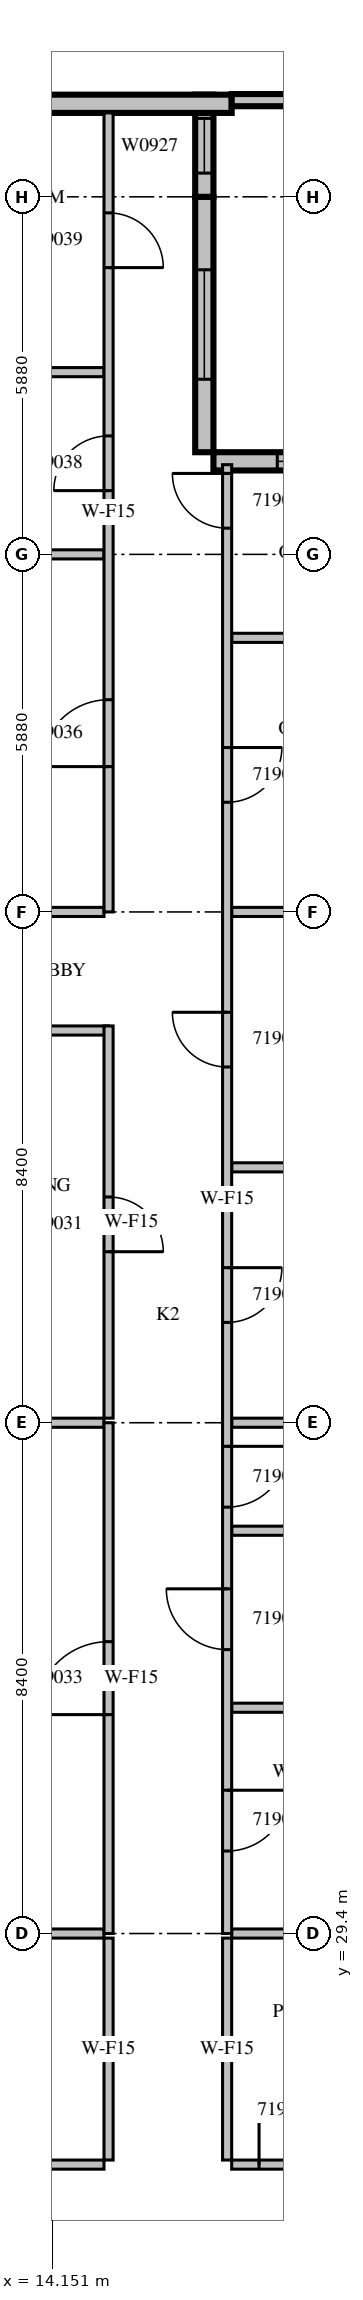
"""IFC4 building model, lengths in metres.
Left out: names, types, materials, properties, quantities, classifications, styles, units other than length and angle.
Written with IfcOpenShell. Run it as: python <this file> out.ifc"""

import sys

from ifc_helpers import new_model, si_unit, direction, frame, frame_2d, origin, place, context, subcontext, project, spatial, rectangle, extrude, source, transform, mapped, element, fill, save


model = new_model("IFC4")
c1 = context("Model", 3, precision=1e-05, world=origin(), true_north=direction((0.0, 1.0)))
c2 = subcontext(c1, "Body", "Model", "MODEL_VIEW")
j1 = project(units=[si_unit("LENGTHUNIT", "METRE"), si_unit("PLANEANGLEUNIT", "RADIAN")], contexts=[c1])
p1 = place(None, origin())
s1 = spatial("IfcSite", under=j1, at=p1, CompositionType="ELEMENT")
p2 = place(p1, origin())
s2 = spatial("IfcBuilding", under=s1, at=p2, CompositionType="ELEMENT")
p3 = place(p2, frame((0.0, 0.0, 90.9)))
s3 = spatial("IfcBuildingStorey", under=s2, at=p3, CompositionType="ELEMENT", Elevation=90.9)
m1 = source(origin(), c2, "Body", "SweptSolid", [
    extrude(rectangle(XDim=4.2, YDim=0.3, at=frame_2d((2.1, 0.0))), origin(), (0.0, 0.0, 1.0), 3.8),
])
p4 = place(p3, frame((21.0, 53.61, 0.0), z_axis=(0.0, 0.0, 1.0), x_axis=(-1.0, 0.0, 0.0)))
e1 = element("IfcWall", 1, at=p4, inside=s3, PredefinedType="STANDARD", context=c2, shape_type="MappedRepresentation", body=[
    mapped(m1, transform((0.0, 0.0, 0.0), scale=1.0)),
])
m2 = source(origin(), c2, "Body", "SweptSolid", [
    extrude(rectangle(XDim=1.8, YDim=2.4, at=frame_2d((0.9, 1.2))), frame((0.0, 0.16, 0.0), z_axis=(0.0, -1.0, 0.0), x_axis=(1.0, 0.0, 0.0)), (0.0, 0.0, 1.0), 0.32),
])
p5 = place(p4, frame((1.35, 0.0, 0.0)))
e2 = element("IfcOpeningElement", 2, at=p5, cuts=e1, PredefinedType="OPENING", context=c2, shape_type="MappedRepresentation", body=[
    mapped(m2, transform((0.0, 0.0, 0.0), scale=1.0)),
])
p6 = place(p3, frame((16.65, 53.76, 0.0), z_axis=(0.0, 0.0, 1.0), x_axis=(0.0, 1.0, 0.0)))
e3 = element("IfcWall", 3, at=p6, inside=s3, PredefinedType="STANDARD", context=c2, shape_type="MappedRepresentation", body=[
    mapped(m1, transform((0.0, 0.0, 0.0), scale=1.0)),
])
p7 = place(p6, frame((1.2, 0.0, 0.0)))
e4 = element("IfcOpeningElement", 4, at=p7, cuts=e3, PredefinedType="OPENING", context=c2, shape_type="MappedRepresentation", body=[
    mapped(m2, transform((0.0, 0.0, 0.0), scale=1.0)),
])
m3 = source(origin(), c2, "Body", "SweptSolid", [
    extrude(rectangle(XDim=1.68, YDim=0.3, at=frame_2d((0.84, 0.0))), origin(), (0.0, 0.0, 1.0), 3.8),
])
p8 = place(p3, frame((16.65, 57.96, 0.0), z_axis=(0.0, 0.0, 1.0), x_axis=(0.0, 1.0, 0.0)))
e5 = element("IfcWall", 5, at=p8, inside=s3, PredefinedType="STANDARD", context=c2, shape_type="MappedRepresentation", body=[
    mapped(m3, transform((0.0, 0.0, 0.0), scale=1.0)),
])
m4 = source(origin(), c2, "Body", "SweptSolid", [
    extrude(rectangle(XDim=0.9, YDim=2.7, at=frame_2d((0.45, 1.35))), frame((0.0, 0.16, 0.0), z_axis=(0.0, -1.0, 0.0), x_axis=(1.0, 0.0, 0.0)), (0.0, 0.0, 1.0), 0.32),
])
p9 = place(p8, frame((0.39, 0.0, 0.6)))
e6 = element("IfcOpeningElement", 6, at=p9, cuts=e5, PredefinedType="OPENING", context=c2, shape_type="MappedRepresentation", body=[
    mapped(m4, transform((0.0, 0.0, 0.0), scale=1.0)),
])
m5 = source(origin(), c2, "Body", "SweptSolid", [
    extrude(rectangle(XDim=8.7, YDim=0.3, at=frame_2d((4.35, 0.0))), origin(), (0.0, 0.0, 1.0), 3.8),
])
p10 = place(p3, frame((17.1, 59.49, 0.0), z_axis=(0.0, 0.0, 1.0), x_axis=(-1.0, 0.0, 0.0)))
e7 = element("IfcWall", 7, at=p10, inside=s3, PredefinedType="STANDARD", context=c2, shape_type="MappedRepresentation", body=[
    mapped(m5, transform((0.0, 0.0, 0.0), scale=1.0)),
])
m6 = source(origin(), c2, "Body", "SweptSolid", [
    extrude(rectangle(XDim=1.8, YDim=2.7, at=frame_2d((0.9, 1.35))), frame((0.0, 0.16, 0.0), z_axis=(0.0, -1.0, 0.0), x_axis=(1.0, 0.0, 0.0)), (0.0, 0.0, 1.0), 0.32),
])
p11 = place(p10, frame((3.075, 0.0, 0.6)))
e8 = element("IfcOpeningElement", 8, at=p11, cuts=e7, PredefinedType="OPENING", context=c2, shape_type="MappedRepresentation", body=[
    mapped(m6, transform((0.0, 0.0, 0.0), scale=1.0)),
])
p12 = place(p10, frame((6.225, 0.0, 0.6)))
e9 = element("IfcOpeningElement", 9, at=p12, cuts=e7, PredefinedType="OPENING", context=c2, shape_type="MappedRepresentation", body=[
    mapped(m6, transform((0.0, 0.0, 0.0), scale=1.0)),
])
m7 = source(origin(), c2, "Body", "SweptSolid", [
    extrude(rectangle(XDim=3.81, YDim=0.2, at=frame_2d((1.905, 0.0))), origin(), (0.0, 0.0, 1.0), 1.1),
])
p13 = place(p3, frame((17.1, 59.55, 0.0), z_axis=(0.0, 0.0, 1.0), x_axis=(1.0, 0.0, 0.0)))
e10 = element("IfcWall", 10, at=p13, inside=s3, PredefinedType="PARAPET", context=c2, shape_type="MappedRepresentation", body=[
    mapped(m7, transform((0.0, 0.0, 0.0), scale=1.0)),
])
m8 = source(origin(), c2, "Body", "SweptSolid", [
    extrude(rectangle(XDim=11.925, YDim=0.15, at=frame_2d((5.963, 0.0))), origin(), (0.0, 0.0, 1.0), 3.8),
])
p14 = place(p3, frame((3.075, 25.6, 0.0), z_axis=(0.0, 0.0, 1.0), x_axis=(1.0, 0.0, 0.0)))
e11 = element("IfcWall", 11, at=p14, inside=s3, PredefinedType="PARTITIONING", context=c2, shape_type="MappedRepresentation", body=[
    mapped(m8, transform((0.0, 0.0, 0.0), scale=1.0)),
])
m9 = source(origin(), c2, "Body", "SweptSolid", [
    extrude(rectangle(XDim=0.9, YDim=2.1, at=frame_2d((0.45, 1.05))), frame((0.0, 0.085, 0.0), z_axis=(0.0, -1.0, 0.0), x_axis=(1.0, 0.0, 0.0)), (0.0, 0.0, 1.0), 0.17),
])
p15 = place(p14, frame((1.462, 0.0, 0.0)))
e12 = element("IfcOpeningElement", 12, at=p15, cuts=e11, PredefinedType="OPENING", context=c2, shape_type="MappedRepresentation", body=[
    mapped(m9, transform((0.0, 0.0, 0.0), scale=1.0)),
])
p16 = place(p14, frame((8.3, 0.0, 0.0)))
e13 = element("IfcOpeningElement", 13, at=p16, cuts=e11, PredefinedType="OPENING", context=c2, shape_type="MappedRepresentation", body=[
    mapped(m9, transform((0.0, 0.0, 0.0), scale=1.0)),
])
m10 = source(origin(), c2, "Body", "SweptSolid", [
    extrude(rectangle(XDim=3.6, YDim=0.15, at=frame_2d((1.8, 0.0))), origin(), (0.0, 0.0, 1.0), 3.8),
])
p17 = place(p3, frame((17.1, 25.6, 0.0), z_axis=(0.0, 0.0, 1.0), x_axis=(1.0, 0.0, 0.0)))
e14 = element("IfcWall", 14, at=p17, inside=s3, PredefinedType="PARTITIONING", context=c2, shape_type="MappedRepresentation", body=[
    mapped(m10, transform((0.0, 0.0, 0.0), scale=1.0)),
])
p18 = place(p17, frame((0.45, 0.0, 0.0)))
e15 = element("IfcOpeningElement", 15, at=p18, cuts=e14, PredefinedType="OPENING", context=c2, shape_type="MappedRepresentation", body=[
    mapped(m9, transform((0.0, 0.0, 0.0), scale=1.0)),
])
m11 = source(origin(), c2, "Body", "SweptSolid", [
    extrude(rectangle(XDim=3.65, YDim=0.15, at=frame_2d((1.825, 0.0))), origin(), (0.0, 0.0, 1.0), 3.8),
])
for number, where, z_axis, x_axis in (
    (16, (15.075, 25.675, 0.0), (0.0, 0.0, 1.0), (0.0, 1.0, 0.0)),
    (17, (17.025, 29.325, 0.0), (0.0, 0.0, 1.0), (0.0, -1.0, 0.0)),
):
    element("IfcWall", number, at=place(p3, frame(where, z_axis=z_axis, x_axis=x_axis)), inside=s3, PredefinedType="PARTITIONING", context=c2, shape_type="MappedRepresentation", body=[
        mapped(m11, transform((0.0, 0.0, 0.0), scale=1.0)),
    ])
m12 = source(origin(), c2, "Body", "SweptSolid", [
    extrude(rectangle(XDim=3.901, YDim=0.15, at=frame_2d((1.95, 0.0))), origin(), (0.0, 0.0, 1.0), 3.8),
])
p19 = place(p3, frame((15.0, 29.4, 0.0), z_axis=(0.0, 0.0, 1.0), x_axis=(-1.0, 0.0, 0.0)))
e18 = element("IfcWall", 18, at=p19, inside=s3, PredefinedType="PARTITIONING", context=c2, shape_type="MappedRepresentation", body=[
    mapped(m12, transform((0.0, 0.0, 0.0), scale=1.0)),
])
m13 = source(origin(), c2, "Body", "SweptSolid", [
    extrude(rectangle(XDim=2.701, YDim=0.15, at=frame_2d((1.351, 0.0))), origin(), (0.0, 0.0, 1.0), 3.8),
])
p20 = place(p3, frame((19.801, 29.4, 0.0), z_axis=(0.0, 0.0, 1.0), x_axis=(-1.0, 0.0, 0.0)))
e19 = element("IfcWall", 19, at=p20, inside=s3, PredefinedType="PARTITIONING", context=c2, shape_type="MappedRepresentation", body=[
    mapped(m13, transform((0.0, 0.0, 0.0), scale=1.0)),
])
m14 = source(origin(), c2, "Body", "SweptSolid", [
    extrude(rectangle(XDim=2.775, YDim=0.15, at=frame_2d((1.387, 0.0))), origin(), (0.0, 0.0, 1.0), 3.8),
])
p21 = place(p3, frame((15.075, 44.25, 0.0), z_axis=(0.0, 0.0, 1.0), x_axis=(-1.0, 0.0, 0.0)))
e20 = element("IfcWall", 20, at=p21, inside=s3, PredefinedType="PARTITIONING", context=c2, shape_type="MappedRepresentation", body=[
    mapped(m14, transform((0.0, 0.0, 0.0), scale=1.0)),
])
m15 = source(origin(), c2, "Body", "SweptSolid", [
    extrude(rectangle(XDim=6.45, YDim=0.15, at=frame_2d((3.225, 0.0))), origin(), (0.0, 0.0, 1.0), 3.8),
])
p22 = place(p3, frame((15.075, 37.875, 0.0), z_axis=(0.0, 0.0, 1.0), x_axis=(0.0, 1.0, 0.0)))
e21 = element("IfcWall", 21, at=p22, inside=s3, PredefinedType="PARTITIONING", context=c2, shape_type="MappedRepresentation", body=[
    mapped(m15, transform((0.0, 0.0, 0.0), scale=1.0)),
])
p23 = place(p22, frame((2.737, 0.0, 0.0)))
e22 = element("IfcOpeningElement", 22, at=p23, cuts=e21, PredefinedType="OPENING", context=c2, shape_type="MappedRepresentation", body=[
    mapped(m9, transform((0.0, 0.0, 0.0), scale=1.0)),
])
m16 = source(origin(), c2, "Body", "SweptSolid", [
    extrude(rectangle(XDim=3.75, YDim=0.15, at=frame_2d((1.875, 0.0))), origin(), (0.0, 0.0, 1.0), 3.8),
])
for number, where, z_axis, x_axis in (
    (23, (15.0, 37.8, 0.0), (0.0, 0.0, 1.0), (-1.0, 0.0, 0.0)),
    (24, (15.0, 52.08, 0.0), (0.0, 0.0, 1.0), (-1.0, 0.0, 0.0)),
    (25, (15.0, 55.077, 0.0), (0.0, 0.0, 1.0), (-1.0, 0.0, 0.0)),
    (26, (15.0, 46.2, 0.0), (0.0, 0.0, 1.0), (-1.0, 0.0, 0.0)),
):
    element("IfcWall", number, at=place(p3, frame(where, z_axis=z_axis, x_axis=x_axis)), inside=s3, PredefinedType="PARTITIONING", context=c2, shape_type="MappedRepresentation", body=[
        mapped(m16, transform((0.0, 0.0, 0.0), scale=1.0)),
    ])
for number, where, z_axis, x_axis in (
    (27, (17.1, 33.113, 0.0), (0.0, 0.0, 1.0), (1.0, 0.0, 0.0)),
    (28, (17.1, 36.024, 0.0), (0.0, 0.0, 1.0), (1.0, 0.0, 0.0)),
    (29, (17.1, 42.0, 0.0), (0.0, 0.0, 1.0), (1.0, 0.0, 0.0)),
    (30, (17.1, 50.708, 0.0), (0.0, 0.0, 1.0), (1.0, 0.0, 0.0)),
):
    element("IfcWall", number, at=place(p3, frame(where, z_axis=z_axis, x_axis=x_axis)), inside=s3, PredefinedType="PARTITIONING", context=c2, shape_type="MappedRepresentation", body=[
        mapped(m10, transform((0.0, 0.0, 0.0), scale=1.0)),
    ])
for number, where, z_axis, x_axis in (
    (31, (19.801, 37.8, 0.0), (0.0, 0.0, 1.0), (-1.0, 0.0, 0.0)),
    (32, (19.801, 46.2, 0.0), (0.0, 0.0, 1.0), (-1.0, 0.0, 0.0)),
):
    element("IfcWall", number, at=place(p3, frame(where, z_axis=z_axis, x_axis=x_axis)), inside=s3, PredefinedType="PARTITIONING", context=c2, shape_type="MappedRepresentation", body=[
        mapped(m13, transform((0.0, 0.0, 0.0), scale=1.0)),
    ])
m17 = source(origin(), c2, "Body", "SweptSolid", [
    extrude(rectangle(XDim=8.4, YDim=0.15, at=frame_2d((4.2, 0.0))), origin(), (0.0, 0.0, 1.0), 3.8),
])
p24 = place(p3, frame((15.075, 29.4, 0.0), z_axis=(0.0, 0.0, 1.0), x_axis=(0.0, 1.0, 0.0)))
e33 = element("IfcWall", 33, at=p24, inside=s3, PredefinedType="PARTITIONING", context=c2, shape_type="MappedRepresentation", body=[
    mapped(m17, transform((0.0, 0.0, 0.0), scale=1.0)),
])
m18 = source(origin(), c2, "Body", "SweptSolid", [
    extrude(rectangle(XDim=1.2, YDim=2.1, at=frame_2d((0.6, 1.05))), frame((0.0, 0.085, 0.0), z_axis=(0.0, -1.0, 0.0), x_axis=(1.0, 0.0, 0.0)), (0.0, 0.0, 1.0), 0.17),
])
p25 = place(p24, frame((3.6, 0.0, 0.0)))
e34 = element("IfcOpeningElement", 34, at=p25, cuts=e33, PredefinedType="OPENING", context=c2, shape_type="MappedRepresentation", body=[
    mapped(m18, transform((0.0, 0.0, 0.0), scale=1.0)),
])
m19 = source(origin(), c2, "Body", "SweptSolid", [
    extrude(rectangle(XDim=13.14, YDim=0.15, at=frame_2d((6.57, 0.0))), origin(), (0.0, 0.0, 1.0), 3.8),
])
p26 = place(p3, frame((15.075, 46.2, 0.0), z_axis=(0.0, 0.0, 1.0), x_axis=(0.0, 1.0, 0.0)))
e35 = element("IfcWall", 35, at=p26, inside=s3, PredefinedType="PARTITIONING", context=c2, shape_type="MappedRepresentation", body=[
    mapped(m19, transform((0.0, 0.0, 0.0), scale=1.0)),
])
m20 = source(origin(), c2, "Body", "SweptSolid", [
    extrude(rectangle(XDim=1.1, YDim=2.1, at=frame_2d((0.55, 1.05))), frame((0.0, 0.085, 0.0), z_axis=(0.0, -1.0, 0.0), x_axis=(1.0, 0.0, 0.0)), (0.0, 0.0, 1.0), 0.17),
])
p27 = place(p26, frame((2.39, 0.0, 0.0)))
e36 = element("IfcOpeningElement", 36, at=p27, cuts=e35, PredefinedType="OPENING", context=c2, shape_type="MappedRepresentation", body=[
    mapped(m20, transform((0.0, 0.0, 0.0), scale=1.0)),
])
p28 = place(p26, frame((6.928, 0.0, 0.0)))
e37 = element("IfcOpeningElement", 37, at=p28, cuts=e35, PredefinedType="OPENING", context=c2, shape_type="MappedRepresentation", body=[
    mapped(m9, transform((0.0, 0.0, 0.0), scale=1.0)),
])
p29 = place(p26, frame((10.596, 0.0, 0.0)))
e38 = element("IfcOpeningElement", 38, at=p29, cuts=e35, PredefinedType="OPENING", context=c2, shape_type="MappedRepresentation", body=[
    mapped(m9, transform((0.0, 0.0, 0.0), scale=1.0)),
])
p30 = place(p3, frame((17.025, 53.555, 0.0), z_axis=(0.0, 0.0, 1.0), x_axis=(0.0, -1.0, 0.0)))
e39 = element("IfcWall", 39, at=p30, inside=s3, PredefinedType="PARTITIONING", context=c2, shape_type="SweptSolid", body=[
    extrude(rectangle(XDim=24.155, YDim=0.15, at=frame_2d((12.078, 0.0))), origin(), (0.0, 0.0, 1.0), 3.8),
])
m21 = source(origin(), c2, "Body", "SweptSolid", [
    extrude(rectangle(XDim=1.0, YDim=2.1, at=frame_2d((0.5, 1.05))), frame((0.0, 0.085, 0.0), z_axis=(0.0, -1.0, 0.0), x_axis=(1.0, 0.0, 0.0)), (0.0, 0.0, 1.0), 0.17),
])
p31 = place(p30, frame((21.798, 0.0, 0.0)))
e40 = element("IfcOpeningElement", 40, at=p31, cuts=e39, PredefinedType="OPENING", context=c2, shape_type="MappedRepresentation", body=[
    mapped(m21, transform((0.0, 0.0, 0.0), scale=1.0)),
])
p32 = place(p30, frame((18.486, 0.0, 0.0)))
e41 = element("IfcOpeningElement", 41, at=p32, cuts=e39, PredefinedType="OPENING", context=c2, shape_type="MappedRepresentation", body=[
    mapped(m21, transform((0.0, 0.0, 0.0), scale=1.0)),
])
p33 = place(p30, frame((16.143, 0.0, 0.0)))
e42 = element("IfcOpeningElement", 42, at=p33, cuts=e39, PredefinedType="OPENING", context=c2, shape_type="MappedRepresentation", body=[
    mapped(m21, transform((0.0, 0.0, 0.0), scale=1.0)),
])
p34 = place(p30, frame((13.205, 0.0, 0.0)))
e43 = element("IfcOpeningElement", 43, at=p34, cuts=e39, PredefinedType="OPENING", context=c2, shape_type="MappedRepresentation", body=[
    mapped(m9, transform((0.0, 0.0, 0.0), scale=1.0)),
])
p35 = place(p30, frame((9.005, 0.0, 0.0)))
e44 = element("IfcOpeningElement", 44, at=p35, cuts=e39, PredefinedType="OPENING", context=c2, shape_type="MappedRepresentation", body=[
    mapped(m9, transform((0.0, 0.0, 0.0), scale=1.0)),
])
p36 = place(p30, frame((4.651, 0.0, 0.0)))
e45 = element("IfcOpeningElement", 45, at=p36, cuts=e39, PredefinedType="OPENING", context=c2, shape_type="MappedRepresentation", body=[
    mapped(m9, transform((0.0, 0.0, 0.0), scale=1.0)),
])
p37 = place(p30, frame((0.144, 0.0, 0.0)))
e46 = element("IfcOpeningElement", 46, at=p37, cuts=e39, PredefinedType="OPENING", context=c2, shape_type="MappedRepresentation", body=[
    mapped(m9, transform((0.0, 0.0, 0.0), scale=1.0)),
])
m22 = source(origin(), c2, "Body", "SweptSolid", [
    extrude(rectangle(XDim=1.8, YDim=2.4, at=frame_2d((0.9, 1.2))), frame((0.0, 0.025, 0.0), z_axis=(0.0, -1.0, 0.0), x_axis=(1.0, 0.0, 0.0)), (0.0, 0.0, 1.0), 0.05),
])
p38 = place(p5, origin())
e47 = element("IfcDoor", 47, at=p38, inside=s3, OperationType="SLIDING_TO_LEFT", PredefinedType="DOOR", context=c2, shape_type="MappedRepresentation", body=[
    mapped(m22, transform((0.0, 0.0, 0.0), scale=1.0)),
])
fill(e2, e47)
p39 = place(p7, origin())
e48 = element("IfcDoor", 48, at=p39, inside=s3, OperationType="SLIDING_TO_LEFT", PredefinedType="DOOR", context=c2, shape_type="MappedRepresentation", body=[
    mapped(m22, transform((0.0, 0.0, 0.0), scale=1.0)),
])
fill(e4, e48)
m23 = source(origin(), c2, "Body", "SweptSolid", [
    extrude(rectangle(XDim=0.9, YDim=2.7, at=frame_2d((0.45, 1.35))), frame((0.0, 0.03, 0.0), z_axis=(0.0, -1.0, 0.0), x_axis=(1.0, 0.0, 0.0)), (0.0, 0.0, 1.0), 0.06),
])
p40 = place(p9, origin())
e49 = element("IfcWindow", 49, at=p40, inside=s3, PartitioningType="SINGLE_PANEL", PredefinedType="WINDOW", context=c2, shape_type="MappedRepresentation", body=[
    mapped(m23, transform((0.0, 0.0, 0.0), scale=1.0)),
])
fill(e6, e49)
m24 = source(origin(), c2, "Body", "SweptSolid", [
    extrude(rectangle(XDim=0.9, YDim=2.1, at=frame_2d((0.45, 1.05))), frame((0.0, 0.025, 0.0), z_axis=(0.0, -1.0, 0.0), x_axis=(1.0, 0.0, 0.0)), (0.0, 0.0, 1.0), 0.05),
])
p41 = place(p18, origin())
e50 = element("IfcDoor", 50, at=p41, inside=s3, OperationType="SINGLE_SWING_LEFT", PredefinedType="DOOR", context=c2, shape_type="MappedRepresentation", body=[
    mapped(m24, transform((0.0, 0.0, 0.0), scale=1.0)),
])
fill(e15, e50)
p42 = place(p23, origin())
e51 = element("IfcDoor", 51, at=p42, inside=s3, OperationType="SINGLE_SWING_RIGHT", PredefinedType="DOOR", context=c2, shape_type="MappedRepresentation", body=[
    mapped(m24, transform((0.0, 0.0, 0.0), scale=1.0)),
])
fill(e22, e51)
m25 = source(origin(), c2, "Body", "SweptSolid", [
    extrude(rectangle(XDim=1.2, YDim=2.1, at=frame_2d((0.6, 1.05))), frame((0.0, 0.025, 0.0), z_axis=(0.0, -1.0, 0.0), x_axis=(1.0, 0.0, 0.0)), (0.0, 0.0, 1.0), 0.05),
])
p43 = place(p25, origin())
e52 = element("IfcDoor", 52, at=p43, inside=s3, OperationType="SINGLE_SWING_LEFT", PredefinedType="DOOR", context=c2, shape_type="MappedRepresentation", body=[
    mapped(m25, transform((0.0, 0.0, 0.0), scale=1.0)),
])
fill(e34, e52)
m26 = source(origin(), c2, "Body", "SweptSolid", [
    extrude(rectangle(XDim=1.1, YDim=2.1, at=frame_2d((0.55, 1.05))), frame((0.0, 0.025, 0.0), z_axis=(0.0, -1.0, 0.0), x_axis=(1.0, 0.0, 0.0)), (0.0, 0.0, 1.0), 0.05),
])
p44 = place(p27, origin())
e53 = element("IfcDoor", 53, at=p44, inside=s3, OperationType="SINGLE_SWING_LEFT", PredefinedType="DOOR", context=c2, shape_type="MappedRepresentation", body=[
    mapped(m26, transform((0.0, 0.0, 0.0), scale=1.0)),
])
fill(e36, e53)
p45 = place(p28, origin())
e54 = element("IfcDoor", 54, at=p45, inside=s3, OperationType="SINGLE_SWING_LEFT", PredefinedType="DOOR", context=c2, shape_type="MappedRepresentation", body=[
    mapped(m24, transform((0.0, 0.0, 0.0), scale=1.0)),
])
fill(e37, e54)
p46 = place(p29, origin())
e55 = element("IfcDoor", 55, at=p46, inside=s3, OperationType="SINGLE_SWING_RIGHT", PredefinedType="DOOR", context=c2, shape_type="MappedRepresentation", body=[
    mapped(m24, transform((0.0, 0.0, 0.0), scale=1.0)),
])
fill(e38, e55)
m27 = source(origin(), c2, "Body", "SweptSolid", [
    extrude(rectangle(XDim=1.0, YDim=2.1, at=frame_2d((0.5, 1.05))), frame((0.0, 0.025, 0.0), z_axis=(0.0, -1.0, 0.0), x_axis=(1.0, 0.0, 0.0)), (0.0, 0.0, 1.0), 0.05),
])
p47 = place(p31, origin())
e56 = element("IfcDoor", 56, at=p47, inside=s3, OperationType="SINGLE_SWING_LEFT", PredefinedType="DOOR", context=c2, shape_type="MappedRepresentation", body=[
    mapped(m27, transform((0.0, 0.0, 0.0), scale=1.0)),
])
fill(e40, e56)
p48 = place(p32, origin())
e57 = element("IfcDoor", 57, at=p48, inside=s3, OperationType="SINGLE_SWING_RIGHT", PredefinedType="DOOR", context=c2, shape_type="MappedRepresentation", body=[
    mapped(m27, transform((0.0, 0.0, 0.0), scale=1.0)),
])
fill(e41, e57)
p49 = place(p33, origin())
e58 = element("IfcDoor", 58, at=p49, inside=s3, OperationType="SINGLE_SWING_LEFT", PredefinedType="DOOR", context=c2, shape_type="MappedRepresentation", body=[
    mapped(m27, transform((0.0, 0.0, 0.0), scale=1.0)),
])
fill(e42, e58)
p50 = place(p34, origin())
e59 = element("IfcDoor", 59, at=p50, inside=s3, OperationType="SINGLE_SWING_LEFT", PredefinedType="DOOR", context=c2, shape_type="MappedRepresentation", body=[
    mapped(m24, transform((0.0, 0.0, 0.0), scale=1.0)),
])
fill(e43, e59)
p51 = place(p35, origin())
e60 = element("IfcDoor", 60, at=p51, inside=s3, OperationType="SINGLE_SWING_RIGHT", PredefinedType="DOOR", context=c2, shape_type="MappedRepresentation", body=[
    mapped(m24, transform((0.0, 0.0, 0.0), scale=1.0)),
])
fill(e44, e60)
p52 = place(p36, origin())
e61 = element("IfcDoor", 61, at=p52, inside=s3, OperationType="SINGLE_SWING_LEFT", PredefinedType="DOOR", context=c2, shape_type="MappedRepresentation", body=[
    mapped(m24, transform((0.0, 0.0, 0.0), scale=1.0)),
])
fill(e45, e61)
p53 = place(p37, origin())
e62 = element("IfcDoor", 62, at=p53, inside=s3, OperationType="SINGLE_SWING_RIGHT", PredefinedType="DOOR", context=c2, shape_type="MappedRepresentation", body=[
    mapped(m24, transform((0.0, 0.0, 0.0), scale=1.0)),
])
fill(e46, e62)
save(model, sys.argv[1])
